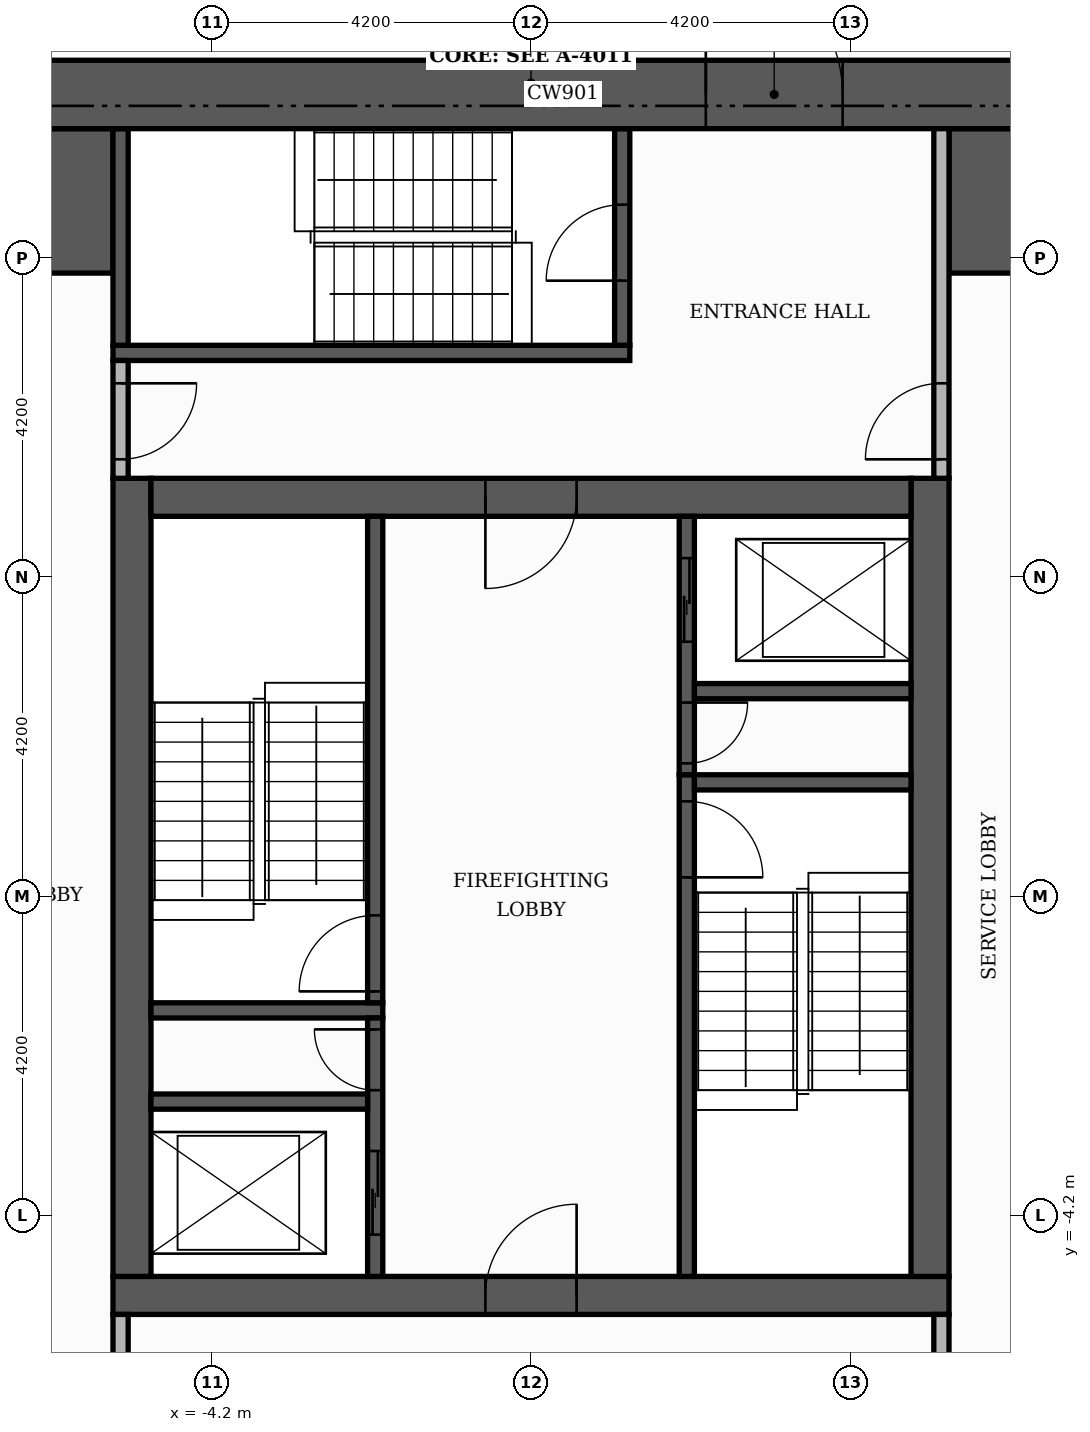
"""IFC4 building model, lengths in metres.
Left out: names, types, materials, properties, quantities, classifications, styles, units other than length and angle.
Written with IfcOpenShell. Run it as: python <this file> out.ifc"""

import sys

from ifc_helpers import new_model, si_unit, direction, frame, frame_2d, origin, place, context, subcontext, project, spatial, rectangle, extrude, element, fill, save


model = new_model("IFC4")
c1 = context("Model", 3, precision=1e-05, world=origin(), true_north=direction((0.0, 1.0)))
c2 = subcontext(c1, "Body", "Model", "MODEL_VIEW")
j1 = project(units=[si_unit("LENGTHUNIT", "METRE"), si_unit("PLANEANGLEUNIT", "RADIAN")], contexts=[c1])
p1 = place(None, origin())
s1 = spatial("IfcSite", under=j1, at=p1, CompositionType="ELEMENT")
p2 = place(p1, origin())
s2 = spatial("IfcBuilding", under=s1, at=p2, CompositionType="ELEMENT")
p3 = place(p2, frame((0.0, 0.0, 66.0)))
s3 = spatial("IfcBuildingStorey", under=s2, at=p3, CompositionType="ELEMENT", Elevation=66.0)
p4 = place(p3, frame((-5.5, -5.25, 0.0), z_axis=(0.0, 0.0, 1.0), x_axis=(1.0, 0.0, 0.0)))
e1 = element("IfcWall", 1, at=p4, inside=s3, PredefinedType="SHEAR", context=c2, shape_type="SweptSolid", body=[
    extrude(rectangle(XDim=11.0, YDim=0.5, at=frame_2d((5.5, 0.0))), origin(), (0.0, 0.0, 1.0), 3.48),
])
p5 = place(p4, frame((4.9, 0.0, 0.0)))
e2 = element("IfcOpeningElement", 2, at=p5, cuts=e1, PredefinedType="OPENING", context=c2, shape_type="SweptSolid", body=[
    extrude(rectangle(XDim=1.2, YDim=2.1, at=frame_2d((0.6, 1.05))), frame((0.0, 0.26, 0.0), z_axis=(0.0, -1.0, 0.0), x_axis=(1.0, 0.0, 0.0)), (0.0, 0.0, 1.0), 0.52),
])
for number, where, z_axis, x_axis in (
    (3, (-5.25, -5.0, 0.0), (0.0, 0.0, 1.0), (0.0, 1.0, 0.0)),
    (4, (5.25, -5.0, 0.0), (0.0, 0.0, 1.0), (0.0, 1.0, 0.0)),
):
    element("IfcWall", number, at=place(p3, frame(where, z_axis=z_axis, x_axis=x_axis)), inside=s3, PredefinedType="SHEAR", context=c2, shape_type="SweptSolid", body=[
        extrude(rectangle(XDim=10.5, YDim=0.5, at=frame_2d((5.25, 0.0))), origin(), (0.0, 0.0, 1.0), 3.48),
    ])
p6 = place(p3, frame((-5.0, 5.25, 0.0), z_axis=(0.0, 0.0, 1.0), x_axis=(1.0, 0.0, 0.0)))
e5 = element("IfcWall", 5, at=p6, inside=s3, PredefinedType="SHEAR", context=c2, shape_type="SweptSolid", body=[
    extrude(rectangle(XDim=10.0, YDim=0.5, at=frame_2d((5.0, 0.0))), origin(), (0.0, 0.0, 1.0), 3.48),
])
p7 = place(p6, frame((4.4, 0.0, 0.0)))
e6 = element("IfcOpeningElement", 6, at=p7, cuts=e5, PredefinedType="OPENING", context=c2, shape_type="SweptSolid", body=[
    extrude(rectangle(XDim=1.2, YDim=2.1, at=frame_2d((0.6, 1.05))), frame((0.0, 0.26, 0.0), z_axis=(0.0, -1.0, 0.0), x_axis=(1.0, 0.0, 0.0)), (0.0, 0.0, 1.0), 0.52),
])
for number, where, z_axis, x_axis in (
    (7, (-10.1, 9.15, 0.0), (0.0, 0.0, 1.0), (1.0, 0.0, 0.0)),
    (8, (5.5, 9.15, 0.0), (0.0, 0.0, 1.0), (1.0, 0.0, 0.0)),
):
    element("IfcWall", number, at=place(p3, frame(where, z_axis=z_axis, x_axis=x_axis)), inside=s3, PredefinedType="SHEAR", context=c2, shape_type="SweptSolid", body=[
        extrude(rectangle(XDim=4.6, YDim=1.9, at=frame_2d((2.3, 0.0))), origin(), (0.0, 0.0, 1.0), 3.48),
    ])
p8 = place(p3, frame((2.05, -5.0, 0.0), z_axis=(0.0, 0.0, 1.0), x_axis=(0.0, 1.0, 0.0)))
e9 = element("IfcWall", 9, at=p8, inside=s3, PredefinedType="SHEAR", context=c2, shape_type="SweptSolid", body=[
    extrude(rectangle(XDim=6.6, YDim=0.2, at=frame_2d((3.3, 0.0))), origin(), (0.0, 0.0, 1.0), 3.48),
])
p9 = place(p8, frame((5.25, 0.0, 0.0)))
e10 = element("IfcOpeningElement", 10, at=p9, cuts=e9, PredefinedType="OPENING", context=c2, shape_type="SweptSolid", body=[
    extrude(rectangle(XDim=1.0, YDim=2.1, at=frame_2d((0.5, 1.05))), frame((0.0, 0.11, 0.0), z_axis=(0.0, -1.0, 0.0), x_axis=(1.0, 0.0, 0.0)), (0.0, 0.0, 1.0), 0.22),
])
p10 = place(p3, frame((-5.0, -1.5, 0.0), z_axis=(0.0, 0.0, 1.0), x_axis=(1.0, 0.0, 0.0)))
e11 = element("IfcWall", 11, at=p10, inside=s3, PredefinedType="SHEAR", context=c2, shape_type="SweptSolid", body=[
    extrude(rectangle(XDim=3.05, YDim=0.2, at=frame_2d((1.525, 0.0))), origin(), (0.0, 0.0, 1.0), 3.48),
])
p11 = place(p3, frame((-2.05, -1.4, 0.0), z_axis=(0.0, 0.0, 1.0), x_axis=(0.0, 1.0, 0.0)))
e12 = element("IfcWall", 12, at=p11, inside=s3, PredefinedType="SHEAR", context=c2, shape_type="SweptSolid", body=[
    extrude(rectangle(XDim=6.4, YDim=0.2, at=frame_2d((3.2, 0.0))), origin(), (0.0, 0.0, 1.0), 3.48),
])
p12 = place(p11, frame((0.15, 0.0, 0.0)))
e13 = element("IfcOpeningElement", 13, at=p12, cuts=e12, PredefinedType="OPENING", context=c2, shape_type="SweptSolid", body=[
    extrude(rectangle(XDim=1.0, YDim=2.1, at=frame_2d((0.5, 1.05))), frame((0.0, 0.11, 0.0), z_axis=(0.0, -1.0, 0.0), x_axis=(1.0, 0.0, 0.0)), (0.0, 0.0, 1.0), 0.22),
])
p13 = place(p3, frame((2.15, 1.5, 0.0), z_axis=(0.0, 0.0, 1.0), x_axis=(1.0, 0.0, 0.0)))
e14 = element("IfcWall", 14, at=p13, inside=s3, PredefinedType="SHEAR", context=c2, shape_type="SweptSolid", body=[
    extrude(rectangle(XDim=2.85, YDim=0.2, at=frame_2d((1.425, 0.0))), origin(), (0.0, 0.0, 1.0), 3.48),
])
p14 = place(p3, frame((-5.5, 7.15, 0.0), z_axis=(0.0, 0.0, 1.0), x_axis=(1.0, 0.0, 0.0)))
e15 = element("IfcWall", 15, at=p14, inside=s3, PredefinedType="SHEAR", context=c2, shape_type="SweptSolid", body=[
    extrude(rectangle(XDim=6.8, YDim=0.2, at=frame_2d((3.4, 0.0))), origin(), (0.0, 0.0, 1.0), 3.48),
])
p15 = place(p3, frame((-5.4, 7.25, 0.0), z_axis=(0.0, 0.0, 1.0), x_axis=(0.0, 1.0, 0.0)))
e16 = element("IfcWall", 16, at=p15, inside=s3, PredefinedType="SHEAR", context=c2, shape_type="SweptSolid", body=[
    extrude(rectangle(XDim=2.85, YDim=0.2, at=frame_2d((1.425, 0.0))), origin(), (0.0, 0.0, 1.0), 3.48),
])
p16 = place(p3, frame((1.2, 7.25, 0.0), z_axis=(0.0, 0.0, 1.0), x_axis=(0.0, 1.0, 0.0)))
e17 = element("IfcWall", 17, at=p16, inside=s3, PredefinedType="SHEAR", context=c2, shape_type="SweptSolid", body=[
    extrude(rectangle(XDim=2.85, YDim=0.2, at=frame_2d((1.425, 0.0))), origin(), (0.0, 0.0, 1.0), 3.48),
])
p17 = place(p16, frame((0.85, 0.0, 0.0)))
e18 = element("IfcOpeningElement", 18, at=p17, cuts=e17, PredefinedType="OPENING", context=c2, shape_type="SweptSolid", body=[
    extrude(rectangle(XDim=1.0, YDim=2.1, at=frame_2d((0.5, 1.05))), frame((0.0, 0.11, 0.0), z_axis=(0.0, -1.0, 0.0), x_axis=(1.0, 0.0, 0.0)), (0.0, 0.0, 1.0), 0.22),
])
p18 = place(p3, frame((-2.05, -5.0, 0.0), z_axis=(0.0, 0.0, 1.0), x_axis=(0.0, 1.0, 0.0)))
e19 = element("IfcWall", 19, at=p18, inside=s3, PredefinedType="SHEAR", context=c2, shape_type="SweptSolid", body=[
    extrude(rectangle(XDim=3.4, YDim=0.2, at=frame_2d((1.7, 0.0))), origin(), (0.0, 0.0, 1.0), 3.48),
])
p19 = place(p18, frame((0.55, 0.0, 0.0)))
e20 = element("IfcOpeningElement", 20, at=p19, cuts=e19, PredefinedType="OPENING", context=c2, shape_type="SweptSolid", body=[
    extrude(rectangle(XDim=1.1, YDim=2.1, at=frame_2d((0.55, 1.05))), frame((0.0, 0.11, 0.0), z_axis=(0.0, -1.0, 0.0), x_axis=(1.0, 0.0, 0.0)), (0.0, 0.0, 1.0), 0.22),
])
p20 = place(p18, frame((2.45, 0.0, 0.0)))
e21 = element("IfcOpeningElement", 21, at=p20, cuts=e19, PredefinedType="OPENING", context=c2, shape_type="SweptSolid", body=[
    extrude(rectangle(XDim=0.8, YDim=2.1, at=frame_2d((0.4, 1.05))), frame((0.0, 0.11, 0.0), z_axis=(0.0, -1.0, 0.0), x_axis=(1.0, 0.0, 0.0)), (0.0, 0.0, 1.0), 0.22),
])
p21 = place(p3, frame((-5.0, -2.7, 0.0), z_axis=(0.0, 0.0, 1.0), x_axis=(1.0, 0.0, 0.0)))
e22 = element("IfcWall", 22, at=p21, inside=s3, PredefinedType="SHEAR", context=c2, shape_type="SweptSolid", body=[
    extrude(rectangle(XDim=2.85, YDim=0.2, at=frame_2d((1.425, 0.0))), origin(), (0.0, 0.0, 1.0), 3.48),
])
p22 = place(p3, frame((2.05, 1.6, 0.0), z_axis=(0.0, 0.0, 1.0), x_axis=(0.0, 1.0, 0.0)))
e23 = element("IfcWall", 23, at=p22, inside=s3, PredefinedType="SHEAR", context=c2, shape_type="SweptSolid", body=[
    extrude(rectangle(XDim=3.4, YDim=0.2, at=frame_2d((1.7, 0.0))), origin(), (0.0, 0.0, 1.0), 3.48),
])
p23 = place(p22, frame((1.75, 0.0, 0.0)))
e24 = element("IfcOpeningElement", 24, at=p23, cuts=e23, PredefinedType="OPENING", context=c2, shape_type="SweptSolid", body=[
    extrude(rectangle(XDim=1.1, YDim=2.1, at=frame_2d((0.55, 1.05))), frame((0.0, 0.11, 0.0), z_axis=(0.0, -1.0, 0.0), x_axis=(1.0, 0.0, 0.0)), (0.0, 0.0, 1.0), 0.22),
])
p24 = place(p22, frame((0.15, 0.0, 0.0)))
e25 = element("IfcOpeningElement", 25, at=p24, cuts=e23, PredefinedType="OPENING", context=c2, shape_type="SweptSolid", body=[
    extrude(rectangle(XDim=0.8, YDim=2.1, at=frame_2d((0.4, 1.05))), frame((0.0, 0.11, 0.0), z_axis=(0.0, -1.0, 0.0), x_axis=(1.0, 0.0, 0.0)), (0.0, 0.0, 1.0), 0.22),
])
p25 = place(p3, frame((2.15, 2.7, 0.0), z_axis=(0.0, 0.0, 1.0), x_axis=(1.0, 0.0, 0.0)))
e26 = element("IfcWall", 26, at=p25, inside=s3, PredefinedType="SHEAR", context=c2, shape_type="SweptSolid", body=[
    extrude(rectangle(XDim=2.85, YDim=0.2, at=frame_2d((1.425, 0.0))), origin(), (0.0, 0.0, 1.0), 3.48),
])
p26 = place(p3, frame((-11.0, 10.55, 0.0), z_axis=(0.0, 0.0, 1.0), x_axis=(1.0, 0.0, 0.0)))
e27 = element("IfcWall", 27, at=p26, inside=s3, PredefinedType="SHEAR", context=c2, shape_type="SweptSolid", body=[
    extrude(rectangle(XDim=22.0, YDim=0.9, at=frame_2d((11.0, 0.0))), origin(), (0.0, 0.0, 1.0), 3.48),
])
p27 = place(p26, frame((13.3, 0.0, 0.0)))
e28 = element("IfcOpeningElement", 28, at=p27, cuts=e27, PredefinedType="OPENING", context=c2, shape_type="SweptSolid", body=[
    extrude(rectangle(XDim=1.8, YDim=2.2, at=frame_2d((0.9, 1.1))), frame((0.0, 0.46, 0.0), z_axis=(0.0, -1.0, 0.0), x_axis=(1.0, 0.0, 0.0)), (0.0, 0.0, 1.0), 0.92),
])
p28 = place(p3, frame((-5.4, -10.1, 0.0), z_axis=(0.0, 0.0, 1.0), x_axis=(0.0, 1.0, 0.0)))
e29 = element("IfcWall", 29, at=p28, inside=s3, PredefinedType="PARTITIONING", context=c2, shape_type="SweptSolid", body=[
    extrude(rectangle(XDim=4.6, YDim=0.2, at=frame_2d((2.3, 0.0))), origin(), (0.0, 0.0, 1.0), 3.48),
])
p29 = place(p28, frame((2.9, 0.0, 0.0)))
e30 = element("IfcOpeningElement", 30, at=p29, cuts=e29, PredefinedType="OPENING", context=c2, shape_type="SweptSolid", body=[
    extrude(rectangle(XDim=1.0, YDim=2.1, at=frame_2d((0.5, 1.05))), frame((0.0, 0.11, 0.0), z_axis=(0.0, -1.0, 0.0), x_axis=(1.0, 0.0, 0.0)), (0.0, 0.0, 1.0), 0.22),
])
p30 = place(p3, frame((5.4, -7.9, 0.0), z_axis=(0.0, 0.0, 1.0), x_axis=(0.0, 1.0, 0.0)))
e31 = element("IfcWall", 31, at=p30, inside=s3, PredefinedType="PARTITIONING", context=c2, shape_type="SweptSolid", body=[
    extrude(rectangle(XDim=2.4, YDim=0.2, at=frame_2d((1.2, 0.0))), origin(), (0.0, 0.0, 1.0), 3.48),
])
p31 = place(p30, frame((0.7, 0.0, 0.0)))
e32 = element("IfcOpeningElement", 32, at=p31, cuts=e31, PredefinedType="OPENING", context=c2, shape_type="SweptSolid", body=[
    extrude(rectangle(XDim=1.0, YDim=2.1, at=frame_2d((0.5, 1.05))), frame((0.0, 0.11, 0.0), z_axis=(0.0, -1.0, 0.0), x_axis=(1.0, 0.0, 0.0)), (0.0, 0.0, 1.0), 0.22),
])
p32 = place(p3, frame((-5.4, 5.5, 0.0), z_axis=(0.0, 0.0, 1.0), x_axis=(0.0, 1.0, 0.0)))
e33 = element("IfcWall", 33, at=p32, inside=s3, PredefinedType="PARTITIONING", context=c2, shape_type="SweptSolid", body=[
    extrude(rectangle(XDim=1.55, YDim=0.2, at=frame_2d((0.775, 0.0))), origin(), (0.0, 0.0, 1.0), 3.48),
])
p33 = place(p32, frame((0.25, 0.0, 0.0)))
e34 = element("IfcOpeningElement", 34, at=p33, cuts=e33, PredefinedType="OPENING", context=c2, shape_type="SweptSolid", body=[
    extrude(rectangle(XDim=1.0, YDim=2.1, at=frame_2d((0.5, 1.05))), frame((0.0, 0.11, 0.0), z_axis=(0.0, -1.0, 0.0), x_axis=(1.0, 0.0, 0.0)), (0.0, 0.0, 1.0), 0.22),
])
p34 = place(p3, frame((5.4, 5.5, 0.0), z_axis=(0.0, 0.0, 1.0), x_axis=(0.0, 1.0, 0.0)))
e35 = element("IfcWall", 35, at=p34, inside=s3, PredefinedType="PARTITIONING", context=c2, shape_type="SweptSolid", body=[
    extrude(rectangle(XDim=4.6, YDim=0.2, at=frame_2d((2.3, 0.0))), origin(), (0.0, 0.0, 1.0), 3.48),
])
p35 = place(p34, frame((0.25, 0.0, 0.0)))
e36 = element("IfcOpeningElement", 36, at=p35, cuts=e35, PredefinedType="OPENING", context=c2, shape_type="SweptSolid", body=[
    extrude(rectangle(XDim=1.0, YDim=2.1, at=frame_2d((0.5, 1.05))), frame((0.0, 0.11, 0.0), z_axis=(0.0, -1.0, 0.0), x_axis=(1.0, 0.0, 0.0)), (0.0, 0.0, 1.0), 0.22),
])
p36 = place(p23, origin())
e37 = element("IfcDoor", 37, at=p36, inside=s3, OperationType="SLIDING_TO_LEFT", PredefinedType="DOOR", context=c2, shape_type="SweptSolid", body=[
    extrude(rectangle(XDim=1.1, YDim=2.1, at=frame_2d((0.55, 1.05))), frame((0.0, 0.025, 0.0), z_axis=(0.0, -1.0, 0.0), x_axis=(1.0, 0.0, 0.0)), (0.0, 0.0, 1.0), 0.05),
])
fill(e24, e37)
p37 = place(p19, origin())
e38 = element("IfcDoor", 38, at=p37, inside=s3, OperationType="SLIDING_TO_LEFT", PredefinedType="DOOR", context=c2, shape_type="SweptSolid", body=[
    extrude(rectangle(XDim=1.1, YDim=2.1, at=frame_2d((0.55, 1.05))), frame((0.0, 0.025, 0.0), z_axis=(0.0, -1.0, 0.0), x_axis=(1.0, 0.0, 0.0)), (0.0, 0.0, 1.0), 0.05),
])
fill(e20, e38)
p38 = place(p12, origin())
e39 = element("IfcDoor", 39, at=p38, inside=s3, OperationType="SINGLE_SWING_LEFT", PredefinedType="DOOR", context=c2, shape_type="SweptSolid", body=[
    extrude(rectangle(XDim=1.0, YDim=2.1, at=frame_2d((0.5, 1.05))), frame((0.0, 0.025, 0.0), z_axis=(0.0, -1.0, 0.0), x_axis=(1.0, 0.0, 0.0)), (0.0, 0.0, 1.0), 0.05),
])
fill(e13, e39)
p39 = place(p9, frame((1.0, 0.0, 0.0), z_axis=(0.0, 0.0, 1.0), x_axis=(-1.0, 0.0, 0.0)))
e40 = element("IfcDoor", 40, at=p39, inside=s3, OperationType="SINGLE_SWING_LEFT", PredefinedType="DOOR", context=c2, shape_type="SweptSolid", body=[
    extrude(rectangle(XDim=1.0, YDim=2.1, at=frame_2d((0.5, 1.05))), frame((0.0, 0.025, 0.0), z_axis=(0.0, -1.0, 0.0), x_axis=(1.0, 0.0, 0.0)), (0.0, 0.0, 1.0), 0.05),
])
fill(e10, e40)
p40 = place(p24, frame((0.8, 0.0, 0.0), z_axis=(0.0, 0.0, 1.0), x_axis=(-1.0, 0.0, 0.0)))
e41 = element("IfcDoor", 41, at=p40, inside=s3, OperationType="SINGLE_SWING_RIGHT", PredefinedType="DOOR", context=c2, shape_type="SweptSolid", body=[
    extrude(rectangle(XDim=0.8, YDim=2.1, at=frame_2d((0.4, 1.05))), frame((0.0, 0.025, 0.0), z_axis=(0.0, -1.0, 0.0), x_axis=(1.0, 0.0, 0.0)), (0.0, 0.0, 1.0), 0.05),
])
fill(e25, e41)
p41 = place(p20, origin())
e42 = element("IfcDoor", 42, at=p41, inside=s3, OperationType="SINGLE_SWING_RIGHT", PredefinedType="DOOR", context=c2, shape_type="SweptSolid", body=[
    extrude(rectangle(XDim=0.8, YDim=2.1, at=frame_2d((0.4, 1.05))), frame((0.0, 0.025, 0.0), z_axis=(0.0, -1.0, 0.0), x_axis=(1.0, 0.0, 0.0)), (0.0, 0.0, 1.0), 0.05),
])
fill(e21, e42)
p42 = place(p7, frame((1.2, 0.0, 0.0), z_axis=(0.0, 0.0, 1.0), x_axis=(-1.0, 0.0, 0.0)))
e43 = element("IfcDoor", 43, at=p42, inside=s3, OperationType="SINGLE_SWING_LEFT", PredefinedType="DOOR", context=c2, shape_type="SweptSolid", body=[
    extrude(rectangle(XDim=1.2, YDim=2.1, at=frame_2d((0.6, 1.05))), frame((0.0, 0.025, 0.0), z_axis=(0.0, -1.0, 0.0), x_axis=(1.0, 0.0, 0.0)), (0.0, 0.0, 1.0), 0.05),
])
fill(e6, e43)
p43 = place(p5, origin())
e44 = element("IfcDoor", 44, at=p43, inside=s3, OperationType="SINGLE_SWING_RIGHT", PredefinedType="DOOR", context=c2, shape_type="SweptSolid", body=[
    extrude(rectangle(XDim=1.2, YDim=2.1, at=frame_2d((0.6, 1.05))), frame((0.0, 0.025, 0.0), z_axis=(0.0, -1.0, 0.0), x_axis=(1.0, 0.0, 0.0)), (0.0, 0.0, 1.0), 0.05),
])
fill(e2, e44)
p44 = place(p17, origin())
e45 = element("IfcDoor", 45, at=p44, inside=s3, OperationType="SINGLE_SWING_LEFT", PredefinedType="DOOR", context=c2, shape_type="SweptSolid", body=[
    extrude(rectangle(XDim=1.0, YDim=2.1, at=frame_2d((0.5, 1.05))), frame((0.0, 0.025, 0.0), z_axis=(0.0, -1.0, 0.0), x_axis=(1.0, 0.0, 0.0)), (0.0, 0.0, 1.0), 0.05),
])
fill(e18, e45)
p45 = place(p33, frame((1.0, 0.0, 0.0), z_axis=(0.0, 0.0, 1.0), x_axis=(-1.0, 0.0, 0.0)))
e46 = element("IfcDoor", 46, at=p45, inside=s3, OperationType="SINGLE_SWING_RIGHT", PredefinedType="DOOR", context=c2, shape_type="SweptSolid", body=[
    extrude(rectangle(XDim=1.0, YDim=2.1, at=frame_2d((0.5, 1.05))), frame((0.0, 0.025, 0.0), z_axis=(0.0, -1.0, 0.0), x_axis=(1.0, 0.0, 0.0)), (0.0, 0.0, 1.0), 0.05),
])
fill(e34, e46)
p46 = place(p35, origin())
e47 = element("IfcDoor", 47, at=p46, inside=s3, OperationType="SINGLE_SWING_LEFT", PredefinedType="DOOR", context=c2, shape_type="SweptSolid", body=[
    extrude(rectangle(XDim=1.0, YDim=2.1, at=frame_2d((0.5, 1.05))), frame((0.0, 0.025, 0.0), z_axis=(0.0, -1.0, 0.0), x_axis=(1.0, 0.0, 0.0)), (0.0, 0.0, 1.0), 0.05),
])
fill(e36, e47)
p47 = place(p27, origin())
e48 = element("IfcDoor", 48, at=p47, inside=s3, OperationType="DOUBLE_DOOR_SINGLE_SWING", PredefinedType="DOOR", context=c2, shape_type="SweptSolid", body=[
    extrude(rectangle(XDim=1.8, YDim=2.2, at=frame_2d((0.9, 1.1))), frame((0.0, 0.025, 0.0), z_axis=(0.0, -1.0, 0.0), x_axis=(1.0, 0.0, 0.0)), (0.0, 0.0, 1.0), 0.05),
])
fill(e28, e48)
save(model, sys.argv[1])
